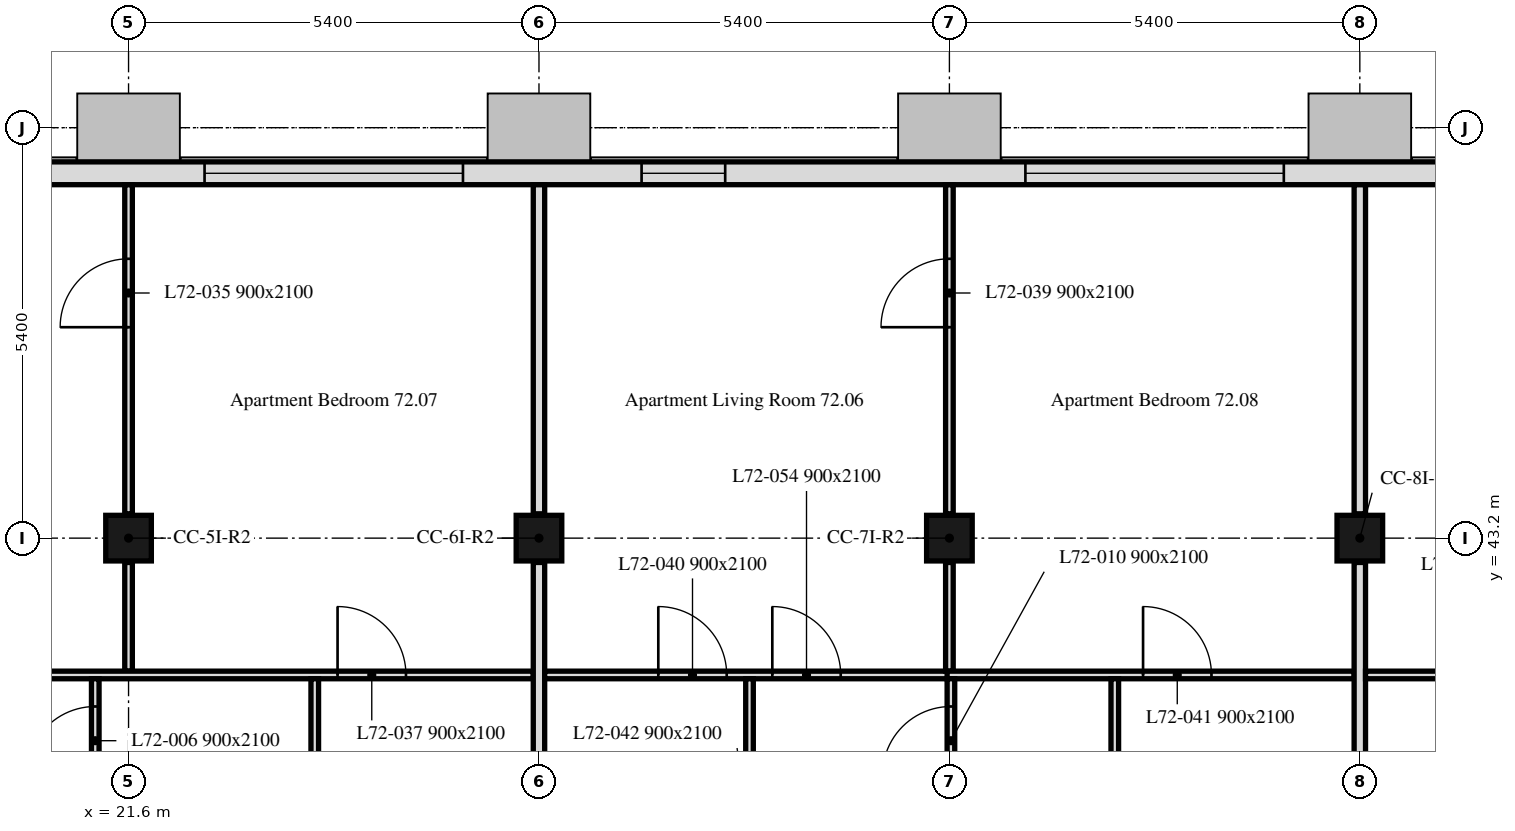
"""IFC4 building model, lengths in metres.
Left out: names, types, materials, properties, quantities, classifications, styles, units other than length and angle.
Written with IfcOpenShell. Run it as: python <this file> out.ifc"""

import sys

from ifc_helpers import new_model, si_unit, direction, frame, frame_2d, origin, origin_2d, place, context, subcontext, project, spatial, rectangle, extrude, element, fill, save


model = new_model("IFC4")
c1 = context("Model", 3, precision=1e-05, world=origin(), true_north=direction((0.0, 1.0)))
c2 = subcontext(c1, "Body", "Model", "MODEL_VIEW")
j1 = project(units=[si_unit("LENGTHUNIT", "METRE"), si_unit("PLANEANGLEUNIT", "RADIAN")], contexts=[c1])
p1 = place(None, origin())
s1 = spatial("IfcSite", under=j1, at=p1, CompositionType="ELEMENT")
p2 = place(p1, origin())
s2 = spatial("IfcBuilding", under=s1, at=p2, CompositionType="ELEMENT")
p3 = place(p2, frame((0.0, 0.0, 291.7)))
s3 = spatial("IfcBuildingStorey", under=s2, at=p3, CompositionType="ELEMENT", Elevation=291.7)
for number, where, z_axis, x_axis in (
    (1, (21.6, 43.2, 0.0), (0.0, 0.0, 1.0), (1.0, 0.0, 0.0)),
    (2, (27.0, 43.2, 0.0), (0.0, 0.0, 1.0), (1.0, 0.0, 0.0)),
    (3, (32.4, 43.2, 0.0), (0.0, 0.0, 1.0), (1.0, 0.0, 0.0)),
    (4, (37.8, 43.2, 0.0), (0.0, 0.0, 1.0), (1.0, 0.0, 0.0)),
):
    element("IfcColumn", number, at=place(p3, frame(where, z_axis=z_axis, x_axis=x_axis)), inside=s3, PredefinedType="COLUMN", context=c2, shape_type="SweptSolid", body=[
        extrude(rectangle(XDim=0.6, YDim=0.6, at=origin_2d()), origin(), (0.0, 0.0, 1.0), 3.0),
    ])
p4 = place(p3, frame((43.014, 48.0, 0.0), z_axis=(0.0, 0.0, 1.0), x_axis=(-1.0, 0.0, 0.0)))
e5 = element("IfcWall", 5, at=p4, inside=s3, PredefinedType="SOLIDWALL", context=c2, shape_type="SweptSolid", body=[
    extrude(rectangle(XDim=32.027, YDim=0.3, at=frame_2d((16.014, 0.0))), origin(), (0.0, 0.0, 1.0), 3.0),
])
p5 = place(p4, frame((2.764, 0.0, 0.9)))
e6 = element("IfcOpeningElement", 6, at=p5, cuts=e5, PredefinedType="OPENING", context=c2, shape_type="SweptSolid", body=[
    extrude(rectangle(XDim=1.1, YDim=1.7, at=frame_2d((0.55, 0.85))), frame((0.0, 0.16, 0.0), z_axis=(0.0, -1.0, 0.0), x_axis=(1.0, 0.0, 0.0)), (0.0, 0.0, 1.0), 0.32),
])
p6 = place(p4, frame((6.214, 0.0, 0.9)))
e7 = element("IfcOpeningElement", 7, at=p6, cuts=e5, PredefinedType="OPENING", context=c2, shape_type="SweptSolid", body=[
    extrude(rectangle(XDim=3.4, YDim=1.7, at=frame_2d((1.7, 0.85))), frame((0.0, 0.16, 0.0), z_axis=(0.0, -1.0, 0.0), x_axis=(1.0, 0.0, 0.0)), (0.0, 0.0, 1.0), 0.32),
])
p7 = place(p4, frame((13.564, 0.0, 0.9)))
e8 = element("IfcOpeningElement", 8, at=p7, cuts=e5, PredefinedType="OPENING", context=c2, shape_type="SweptSolid", body=[
    extrude(rectangle(XDim=1.1, YDim=1.7, at=frame_2d((0.55, 0.85))), frame((0.0, 0.16, 0.0), z_axis=(0.0, -1.0, 0.0), x_axis=(1.0, 0.0, 0.0)), (0.0, 0.0, 1.0), 0.32),
])
p8 = place(p4, frame((17.014, 0.0, 0.9)))
e9 = element("IfcOpeningElement", 9, at=p8, cuts=e5, PredefinedType="OPENING", context=c2, shape_type="SweptSolid", body=[
    extrude(rectangle(XDim=3.4, YDim=1.7, at=frame_2d((1.7, 0.85))), frame((0.0, 0.16, 0.0), z_axis=(0.0, -1.0, 0.0), x_axis=(1.0, 0.0, 0.0)), (0.0, 0.0, 1.0), 0.32),
])
p9 = place(p4, frame((24.364, 0.0, 0.9)))
e10 = element("IfcOpeningElement", 10, at=p9, cuts=e5, PredefinedType="OPENING", context=c2, shape_type="SweptSolid", body=[
    extrude(rectangle(XDim=1.1, YDim=1.7, at=frame_2d((0.55, 0.85))), frame((0.0, 0.16, 0.0), z_axis=(0.0, -1.0, 0.0), x_axis=(1.0, 0.0, 0.0)), (0.0, 0.0, 1.0), 0.32),
])
p10 = place(p4, frame((27.814, 0.0, 0.9)))
e11 = element("IfcOpeningElement", 11, at=p10, cuts=e5, PredefinedType="OPENING", context=c2, shape_type="SweptSolid", body=[
    extrude(rectangle(XDim=3.4, YDim=1.7, at=frame_2d((1.7, 0.85))), frame((0.0, 0.16, 0.0), z_axis=(0.0, -1.0, 0.0), x_axis=(1.0, 0.0, 0.0)), (0.0, 0.0, 1.0), 0.32),
])
p11 = place(p3, frame((21.6, 41.45, 0.0), z_axis=(0.0, 0.0, 1.0), x_axis=(0.0, 1.0, 0.0)))
e12 = element("IfcWall", 12, at=p11, inside=s3, PredefinedType="PARTITIONING", context=c2, shape_type="SweptSolid", body=[
    extrude(rectangle(XDim=1.43, YDim=0.1, at=frame_2d((0.715, 0.0))), origin(), (0.0, 0.0, 1.0), 2.4),
])
p12 = place(p3, frame((21.6, 43.52, 0.0), z_axis=(0.0, 0.0, 1.0), x_axis=(0.0, 1.0, 0.0)))
e13 = element("IfcWall", 13, at=p12, inside=s3, PredefinedType="PARTITIONING", context=c2, shape_type="SweptSolid", body=[
    extrude(rectangle(XDim=4.329, YDim=0.1, at=frame_2d((2.165, 0.0))), origin(), (0.0, 0.0, 1.0), 2.4),
])
p13 = place(p12, frame((2.455, 0.0, 0.0)))
e14 = element("IfcOpeningElement", 14, at=p13, cuts=e13, PredefinedType="OPENING", context=c2, shape_type="SweptSolid", body=[
    extrude(rectangle(XDim=0.9, YDim=2.1, at=frame_2d((0.45, 1.05))), frame((0.0, 0.05, 0.0), z_axis=(0.0, -1.0, 0.0), x_axis=(1.0, 0.0, 0.0)), (0.0, 0.0, 1.0), 0.1),
])
p14 = place(p3, frame((16.275, 41.4, 0.0), z_axis=(0.0, 0.0, 1.0), x_axis=(1.0, 0.0, 0.0)))
e15 = element("IfcWall", 15, at=p14, inside=s3, PredefinedType="PARTITIONING", context=c2, shape_type="SweptSolid", body=[
    extrude(rectangle(XDim=10.65, YDim=0.1, at=frame_2d((5.325, 0.0))), origin(), (0.0, 0.0, 1.0), 2.4),
])
p15 = place(p14, frame((0.937, 0.0, 0.0)))
e16 = element("IfcOpeningElement", 16, at=p15, cuts=e15, PredefinedType="OPENING", context=c2, shape_type="SweptSolid", body=[
    extrude(rectangle(XDim=0.9, YDim=2.1, at=frame_2d((0.45, 1.05))), frame((0.0, 0.05, 0.0), z_axis=(0.0, -1.0, 0.0), x_axis=(1.0, 0.0, 0.0)), (0.0, 0.0, 1.0), 0.1),
])
p16 = place(p14, frame((8.075, 0.0, 0.0)))
e17 = element("IfcOpeningElement", 17, at=p16, cuts=e15, PredefinedType="OPENING", context=c2, shape_type="SweptSolid", body=[
    extrude(rectangle(XDim=0.9, YDim=2.1, at=frame_2d((0.45, 1.05))), frame((0.0, 0.05, 0.0), z_axis=(0.0, -1.0, 0.0), x_axis=(1.0, 0.0, 0.0)), (0.0, 0.0, 1.0), 0.1),
])
p17 = place(p14, frame((2.437, 0.0, 0.0)))
e18 = element("IfcOpeningElement", 18, at=p17, cuts=e15, PredefinedType="OPENING", context=c2, shape_type="SweptSolid", body=[
    extrude(rectangle(XDim=0.9, YDim=2.1, at=frame_2d((0.45, 1.05))), frame((0.0, 0.05, 0.0), z_axis=(0.0, -1.0, 0.0), x_axis=(1.0, 0.0, 0.0)), (0.0, 0.0, 1.0), 0.1),
])
p18 = place(p3, frame((27.0, 43.52, 0.0), z_axis=(0.0, 0.0, 1.0), x_axis=(0.0, 1.0, 0.0)))
e19 = element("IfcWall", 19, at=p18, inside=s3, PredefinedType="PARTITIONING", context=c2, shape_type="SweptSolid", body=[
    extrude(rectangle(XDim=4.329, YDim=0.15, at=frame_2d((2.165, 0.0))), origin(), (0.0, 0.0, 1.0), 2.4),
])
p19 = place(p3, frame((21.162, 34.725, 0.0), z_axis=(0.0, 0.0, 1.0), x_axis=(0.0, 1.0, 0.0)))
e20 = element("IfcWall", 20, at=p19, inside=s3, PredefinedType="PARTITIONING", context=c2, shape_type="SweptSolid", body=[
    extrude(rectangle(XDim=6.625, YDim=0.1, at=frame_2d((3.312, 0.0))), origin(), (0.0, 0.0, 1.0), 3.0),
])
p20 = place(p19, frame((5.36, 0.0, 0.0)))
e21 = element("IfcOpeningElement", 21, at=p20, cuts=e20, PredefinedType="OPENING", context=c2, shape_type="SweptSolid", body=[
    extrude(rectangle(XDim=0.9, YDim=2.1, at=frame_2d((0.45, 1.05))), frame((0.0, 0.05, 0.0), z_axis=(0.0, -1.0, 0.0), x_axis=(1.0, 0.0, 0.0)), (0.0, 0.0, 1.0), 0.1),
])
p21 = place(p19, frame((0.25, 0.0, 0.0)))
e22 = element("IfcOpeningElement", 22, at=p21, cuts=e20, PredefinedType="OPENING", context=c2, shape_type="SweptSolid", body=[
    extrude(rectangle(XDim=0.9, YDim=2.1, at=frame_2d((0.45, 1.05))), frame((0.0, 0.05, 0.0), z_axis=(0.0, -1.0, 0.0), x_axis=(1.0, 0.0, 0.0)), (0.0, 0.0, 1.0), 0.1),
])
p22 = place(p3, frame((24.05, 37.2, 0.0), z_axis=(0.0, 0.0, 1.0), x_axis=(0.0, 1.0, 0.0)))
e23 = element("IfcWall", 23, at=p22, inside=s3, PredefinedType="PARTITIONING", context=c2, shape_type="SweptSolid", body=[
    extrude(rectangle(XDim=4.15, YDim=0.1, at=frame_2d((2.075, 0.0))), origin(), (0.0, 0.0, 1.0), 3.0),
])
p23 = place(p3, frame((27.0, 38.12, 0.0), z_axis=(0.0, 0.0, 1.0), x_axis=(0.0, 1.0, 0.0)))
e24 = element("IfcWall", 24, at=p23, inside=s3, PredefinedType="PARTITIONING", context=c2, shape_type="SweptSolid", body=[
    extrude(rectangle(XDim=4.76, YDim=0.15, at=frame_2d((2.38, 0.0))), origin(), (0.0, 0.0, 1.0), 2.4),
])
p24 = place(p3, frame((27.075, 41.4, 0.0), z_axis=(0.0, 0.0, 1.0), x_axis=(1.0, 0.0, 0.0)))
e25 = element("IfcWall", 25, at=p24, inside=s3, PredefinedType="PARTITIONING", context=c2, shape_type="SweptSolid", body=[
    extrude(rectangle(XDim=5.375, YDim=0.1, at=frame_2d((2.688, 0.0))), origin(), (0.0, 0.0, 1.0), 3.0),
])
p25 = place(p24, frame((1.495, 0.0, 0.0)))
e26 = element("IfcOpeningElement", 26, at=p25, cuts=e25, PredefinedType="OPENING", context=c2, shape_type="SweptSolid", body=[
    extrude(rectangle(XDim=0.9, YDim=2.1, at=frame_2d((0.45, 1.05))), frame((0.0, 0.05, 0.0), z_axis=(0.0, -1.0, 0.0), x_axis=(1.0, 0.0, 0.0)), (0.0, 0.0, 1.0), 0.1),
])
p26 = place(p24, frame((2.995, 0.0, 0.0)))
e27 = element("IfcOpeningElement", 27, at=p26, cuts=e25, PredefinedType="OPENING", context=c2, shape_type="SweptSolid", body=[
    extrude(rectangle(XDim=0.9, YDim=2.1, at=frame_2d((0.45, 1.05))), frame((0.0, 0.05, 0.0), z_axis=(0.0, -1.0, 0.0), x_axis=(1.0, 0.0, 0.0)), (0.0, 0.0, 1.0), 0.1),
])
p27 = place(p3, frame((32.4, 41.45, 0.0), z_axis=(0.0, 0.0, 1.0), x_axis=(0.0, 1.0, 0.0)))
e28 = element("IfcWall", 28, at=p27, inside=s3, PredefinedType="PARTITIONING", context=c2, shape_type="SweptSolid", body=[
    extrude(rectangle(XDim=1.43, YDim=0.1, at=frame_2d((0.715, 0.0))), origin(), (0.0, 0.0, 1.0), 2.4),
])
p28 = place(p3, frame((32.4, 43.52, 0.0), z_axis=(0.0, 0.0, 1.0), x_axis=(0.0, 1.0, 0.0)))
e29 = element("IfcWall", 29, at=p28, inside=s3, PredefinedType="PARTITIONING", context=c2, shape_type="SweptSolid", body=[
    extrude(rectangle(XDim=4.329, YDim=0.1, at=frame_2d((2.165, 0.0))), origin(), (0.0, 0.0, 1.0), 2.4),
])
p29 = place(p28, frame((2.455, 0.0, 0.0)))
e30 = element("IfcOpeningElement", 30, at=p29, cuts=e29, PredefinedType="OPENING", context=c2, shape_type="SweptSolid", body=[
    extrude(rectangle(XDim=0.9, YDim=2.1, at=frame_2d((0.45, 1.05))), frame((0.0, 0.05, 0.0), z_axis=(0.0, -1.0, 0.0), x_axis=(1.0, 0.0, 0.0)), (0.0, 0.0, 1.0), 0.1),
])
p30 = place(p3, frame((32.37, 41.4, 0.0), z_axis=(0.0, 0.0, 1.0), x_axis=(1.0, 0.0, 0.0)))
e31 = element("IfcWall", 31, at=p30, inside=s3, PredefinedType="PARTITIONING", context=c2, shape_type="SweptSolid", body=[
    extrude(rectangle(XDim=5.355, YDim=0.1, at=frame_2d((2.677, 0.0))), origin(), (0.0, 0.0, 1.0), 3.0),
])
p31 = place(p30, frame((2.578, 0.0, 0.0)))
e32 = element("IfcOpeningElement", 32, at=p31, cuts=e31, PredefinedType="OPENING", context=c2, shape_type="SweptSolid", body=[
    extrude(rectangle(XDim=0.9, YDim=2.1, at=frame_2d((0.45, 1.05))), frame((0.0, 0.05, 0.0), z_axis=(0.0, -1.0, 0.0), x_axis=(1.0, 0.0, 0.0)), (0.0, 0.0, 1.0), 0.1),
])
p32 = place(p3, frame((37.8, 43.52, 0.0), z_axis=(0.0, 0.0, 1.0), x_axis=(0.0, 1.0, 0.0)))
e33 = element("IfcWall", 33, at=p32, inside=s3, PredefinedType="PARTITIONING", context=c2, shape_type="SweptSolid", body=[
    extrude(rectangle(XDim=4.329, YDim=0.15, at=frame_2d((2.165, 0.0))), origin(), (0.0, 0.0, 1.0), 2.4),
])
p33 = place(p3, frame((29.77, 34.725, 0.0), z_axis=(0.0, 0.0, 1.0), x_axis=(0.0, 1.0, 0.0)))
e34 = element("IfcWall", 34, at=p33, inside=s3, PredefinedType="PARTITIONING", context=c2, shape_type="SweptSolid", body=[
    extrude(rectangle(XDim=6.625, YDim=0.1, at=frame_2d((3.312, 0.0))), origin(), (0.0, 0.0, 1.0), 3.0),
])
p34 = place(p33, frame((0.725, 0.0, 0.0)))
e35 = element("IfcOpeningElement", 35, at=p34, cuts=e34, PredefinedType="OPENING", context=c2, shape_type="SweptSolid", body=[
    extrude(rectangle(XDim=0.9, YDim=2.1, at=frame_2d((0.45, 1.05))), frame((0.0, 0.05, 0.0), z_axis=(0.0, -1.0, 0.0), x_axis=(1.0, 0.0, 0.0)), (0.0, 0.0, 1.0), 0.1),
])
p35 = place(p33, frame((4.1, 0.0, 0.0)))
e36 = element("IfcOpeningElement", 36, at=p35, cuts=e34, PredefinedType="OPENING", context=c2, shape_type="SweptSolid", body=[
    extrude(rectangle(XDim=0.9, YDim=2.1, at=frame_2d((0.45, 1.05))), frame((0.0, 0.05, 0.0), z_axis=(0.0, -1.0, 0.0), x_axis=(1.0, 0.0, 0.0)), (0.0, 0.0, 1.0), 0.1),
])
p36 = place(p3, frame((32.42, 38.12, 0.0), z_axis=(0.0, 0.0, 1.0), x_axis=(0.0, 1.0, 0.0)))
e37 = element("IfcWall", 37, at=p36, inside=s3, PredefinedType="PARTITIONING", context=c2, shape_type="SweptSolid", body=[
    extrude(rectangle(XDim=3.23, YDim=0.1, at=frame_2d((1.615, 0.0))), origin(), (0.0, 0.0, 1.0), 2.4),
])
p37 = place(p36, frame((1.965, 0.0, 0.0)))
e38 = element("IfcOpeningElement", 38, at=p37, cuts=e37, PredefinedType="OPENING", context=c2, shape_type="SweptSolid", body=[
    extrude(rectangle(XDim=0.9, YDim=2.1, at=frame_2d((0.45, 1.05))), frame((0.0, 0.05, 0.0), z_axis=(0.0, -1.0, 0.0), x_axis=(1.0, 0.0, 0.0)), (0.0, 0.0, 1.0), 0.1),
])
p38 = place(p3, frame((34.576, 37.2, 0.0), z_axis=(0.0, 0.0, 1.0), x_axis=(0.0, 1.0, 0.0)))
e39 = element("IfcWall", 39, at=p38, inside=s3, PredefinedType="PARTITIONING", context=c2, shape_type="SweptSolid", body=[
    extrude(rectangle(XDim=4.15, YDim=0.1, at=frame_2d((2.075, 0.0))), origin(), (0.0, 0.0, 1.0), 2.4),
])
p39 = place(p3, frame((37.8, 38.12, 0.0), z_axis=(0.0, 0.0, 1.0), x_axis=(0.0, 1.0, 0.0)))
e40 = element("IfcWall", 40, at=p39, inside=s3, PredefinedType="PARTITIONING", context=c2, shape_type="SweptSolid", body=[
    extrude(rectangle(XDim=4.76, YDim=0.15, at=frame_2d((2.38, 0.0))), origin(), (0.0, 0.0, 1.0), 2.4),
])
p40 = place(p3, frame((37.875, 41.4, 0.0), z_axis=(0.0, 0.0, 1.0), x_axis=(1.0, 0.0, 0.0)))
e41 = element("IfcWall", 41, at=p40, inside=s3, PredefinedType="PARTITIONING", context=c2, shape_type="SweptSolid", body=[
    extrude(rectangle(XDim=9.974, YDim=0.1, at=frame_2d((4.987, 0.0))), origin(), (0.0, 0.0, 1.0), 3.0),
])
p41 = place(p40, frame((1.256, 0.0, 0.0)))
e42 = element("IfcOpeningElement", 42, at=p41, cuts=e41, PredefinedType="OPENING", context=c2, shape_type="SweptSolid", body=[
    extrude(rectangle(XDim=0.9, YDim=2.1, at=frame_2d((0.45, 1.05))), frame((0.0, 0.05, 0.0), z_axis=(0.0, -1.0, 0.0), x_axis=(1.0, 0.0, 0.0)), (0.0, 0.0, 1.0), 0.1),
])
p42 = place(p40, frame((7.995, 0.0, 0.0)))
e43 = element("IfcOpeningElement", 43, at=p42, cuts=e41, PredefinedType="OPENING", context=c2, shape_type="SweptSolid", body=[
    extrude(rectangle(XDim=0.9, YDim=2.1, at=frame_2d((0.45, 1.05))), frame((0.0, 0.05, 0.0), z_axis=(0.0, -1.0, 0.0), x_axis=(1.0, 0.0, 0.0)), (0.0, 0.0, 1.0), 0.1),
])
p43 = place(p40, frame((3.29, 0.0, 0.0)))
e44 = element("IfcOpeningElement", 44, at=p43, cuts=e41, PredefinedType="OPENING", context=c2, shape_type="SweptSolid", body=[
    extrude(rectangle(XDim=0.9, YDim=2.1, at=frame_2d((0.45, 1.05))), frame((0.0, 0.05, 0.0), z_axis=(0.0, -1.0, 0.0), x_axis=(1.0, 0.0, 0.0)), (0.0, 0.0, 1.0), 0.1),
])
p44 = place(p6, origin())
e45 = element("IfcWindow", 45, at=p44, inside=s3, PartitioningType="SINGLE_PANEL", PredefinedType="WINDOW", context=c2, shape_type="SweptSolid", body=[
    extrude(rectangle(XDim=3.4, YDim=1.7, at=frame_2d((1.7, 0.85))), frame((0.0, 0.03, 0.0), z_axis=(0.0, -1.0, 0.0), x_axis=(1.0, 0.0, 0.0)), (0.0, 0.0, 1.0), 0.06),
])
fill(e7, e45)
p45 = place(p7, origin())
e46 = element("IfcWindow", 46, at=p45, inside=s3, PartitioningType="SINGLE_PANEL", PredefinedType="WINDOW", context=c2, shape_type="SweptSolid", body=[
    extrude(rectangle(XDim=1.1, YDim=1.7, at=frame_2d((0.55, 0.85))), frame((0.0, 0.03, 0.0), z_axis=(0.0, -1.0, 0.0), x_axis=(1.0, 0.0, 0.0)), (0.0, 0.0, 1.0), 0.06),
])
fill(e8, e46)
p46 = place(p8, origin())
e47 = element("IfcWindow", 47, at=p46, inside=s3, PartitioningType="SINGLE_PANEL", PredefinedType="WINDOW", context=c2, shape_type="SweptSolid", body=[
    extrude(rectangle(XDim=3.4, YDim=1.7, at=frame_2d((1.7, 0.85))), frame((0.0, 0.03, 0.0), z_axis=(0.0, -1.0, 0.0), x_axis=(1.0, 0.0, 0.0)), (0.0, 0.0, 1.0), 0.06),
])
fill(e9, e47)
p47 = place(p20, origin())
e48 = element("IfcDoor", 48, at=p47, inside=s3, OperationType="SINGLE_SWING_LEFT", PredefinedType="DOOR", context=c2, shape_type="SweptSolid", body=[
    extrude(rectangle(XDim=0.9, YDim=2.1, at=frame_2d((0.45, 1.05))), frame((0.0, 0.025, 0.0), z_axis=(0.0, -1.0, 0.0), x_axis=(1.0, 0.0, 0.0)), (0.0, 0.0, 1.0), 0.05),
])
fill(e21, e48)
p48 = place(p37, origin())
e49 = element("IfcDoor", 49, at=p48, inside=s3, OperationType="SINGLE_SWING_RIGHT", PredefinedType="DOOR", context=c2, shape_type="SweptSolid", body=[
    extrude(rectangle(XDim=0.9, YDim=2.1, at=frame_2d((0.45, 1.05))), frame((0.0, 0.025, 0.0), z_axis=(0.0, -1.0, 0.0), x_axis=(1.0, 0.0, 0.0)), (0.0, 0.0, 1.0), 0.05),
])
fill(e38, e49)
p49 = place(p13, origin())
e50 = element("IfcDoor", 50, at=p49, inside=s3, OperationType="SINGLE_SWING_LEFT", PredefinedType="DOOR", context=c2, shape_type="SweptSolid", body=[
    extrude(rectangle(XDim=0.9, YDim=2.1, at=frame_2d((0.45, 1.05))), frame((0.0, 0.025, 0.0), z_axis=(0.0, -1.0, 0.0), x_axis=(1.0, 0.0, 0.0)), (0.0, 0.0, 1.0), 0.05),
])
fill(e14, e50)
p50 = place(p16, origin())
e51 = element("IfcDoor", 51, at=p50, inside=s3, OperationType="SINGLE_SWING_RIGHT", PredefinedType="DOOR", context=c2, shape_type="SweptSolid", body=[
    extrude(rectangle(XDim=0.9, YDim=2.1, at=frame_2d((0.45, 1.05))), frame((0.0, 0.025, 0.0), z_axis=(0.0, -1.0, 0.0), x_axis=(1.0, 0.0, 0.0)), (0.0, 0.0, 1.0), 0.05),
])
fill(e17, e51)
p51 = place(p29, origin())
e52 = element("IfcDoor", 52, at=p51, inside=s3, OperationType="SINGLE_SWING_RIGHT", PredefinedType="DOOR", context=c2, shape_type="SweptSolid", body=[
    extrude(rectangle(XDim=0.9, YDim=2.1, at=frame_2d((0.45, 1.05))), frame((0.0, 0.025, 0.0), z_axis=(0.0, -1.0, 0.0), x_axis=(1.0, 0.0, 0.0)), (0.0, 0.0, 1.0), 0.05),
])
fill(e30, e52)
p52 = place(p25, origin())
e53 = element("IfcDoor", 53, at=p52, inside=s3, OperationType="SINGLE_SWING_LEFT", PredefinedType="DOOR", context=c2, shape_type="SweptSolid", body=[
    extrude(rectangle(XDim=0.9, YDim=2.1, at=frame_2d((0.45, 1.05))), frame((0.0, 0.025, 0.0), z_axis=(0.0, -1.0, 0.0), x_axis=(1.0, 0.0, 0.0)), (0.0, 0.0, 1.0), 0.05),
])
fill(e26, e53)
p53 = place(p31, origin())
e54 = element("IfcDoor", 54, at=p53, inside=s3, OperationType="SINGLE_SWING_RIGHT", PredefinedType="DOOR", context=c2, shape_type="SweptSolid", body=[
    extrude(rectangle(XDim=0.9, YDim=2.1, at=frame_2d((0.45, 1.05))), frame((0.0, 0.025, 0.0), z_axis=(0.0, -1.0, 0.0), x_axis=(1.0, 0.0, 0.0)), (0.0, 0.0, 1.0), 0.05),
])
fill(e32, e54)
p54 = place(p26, origin())
e55 = element("IfcDoor", 55, at=p54, inside=s3, OperationType="SINGLE_SWING_RIGHT", PredefinedType="DOOR", context=c2, shape_type="SweptSolid", body=[
    extrude(rectangle(XDim=0.9, YDim=2.1, at=frame_2d((0.45, 1.05))), frame((0.0, 0.025, 0.0), z_axis=(0.0, -1.0, 0.0), x_axis=(1.0, 0.0, 0.0)), (0.0, 0.0, 1.0), 0.05),
])
fill(e27, e55)
save(model, sys.argv[1])
